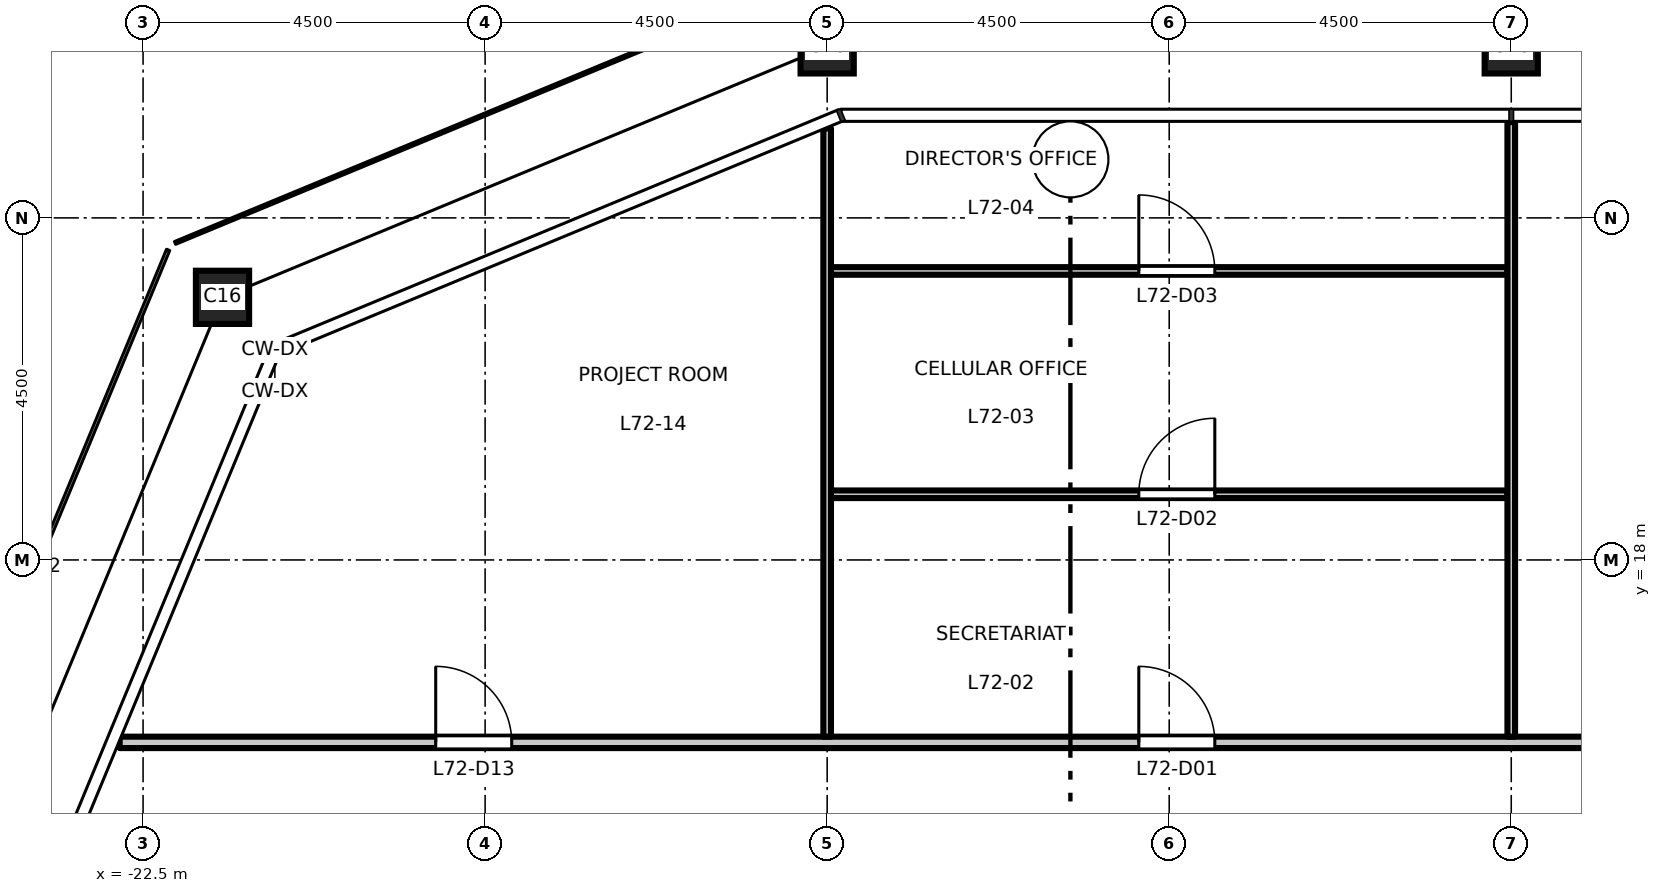
"""IFC4 building model, lengths in metres.
Left out: names, types, materials, properties, quantities, classifications, styles, units other than length and angle.
Written with IfcOpenShell. Run it as: python <this file> out.ifc"""

import sys

from ifc_helpers import new_model, si_unit, direction, frame, frame_2d, origin, origin_2d, place, context, subcontext, project, spatial, rectangle, hollow_rectangle, extrude, element, fill, save


model = new_model("IFC4")
c1 = context("Model", 3, precision=1e-05, world=origin(), true_north=direction((0.0, 1.0)))
c2 = subcontext(c1, "Body", "Model", "MODEL_VIEW")
j1 = project(units=[si_unit("LENGTHUNIT", "METRE"), si_unit("PLANEANGLEUNIT", "RADIAN")], contexts=[c1])
p1 = place(None, origin())
s1 = spatial("IfcSite", under=j1, at=p1, CompositionType="ELEMENT")
p2 = place(p1, origin())
s2 = spatial("IfcBuilding", under=s1, at=p2, CompositionType="ELEMENT")
p3 = place(p2, frame((0.0, 0.0, 334.7)))
s3 = spatial("IfcBuildingStorey", under=s2, at=p3, CompositionType="ELEMENT", Elevation=334.7)
for number, where, z_axis, x_axis in (
    (1, (-4.5, 24.75, 0.0), (0.0, 0.0, 1.0), (1.0, 0.0, 0.0)),
    (2, (-13.5, 24.75, 0.0), (0.0, 0.0, 1.0), (1.0, 0.0, 0.0)),
    (3, (-21.455, 21.455, 0.0), (0.0, 0.0, 1.0), (1.0, 0.0, 0.0)),
):
    element("IfcColumn", number, at=place(p3, frame(where, z_axis=z_axis, x_axis=x_axis)), inside=s3, PredefinedType="COLUMN", context=c2, shape_type="SweptSolid", body=[
        extrude(hollow_rectangle(XDim=0.7, YDim=0.7, WallThickness=0.036, at=origin_2d()), origin(), (0.0, 0.0, 1.0), 4.5),
    ])
p4 = place(p3, frame((-22.808, 15.6, 0.0), z_axis=(0.0, 0.0, 1.0), x_axis=(1.0, 0.0, 0.0)))
e4 = element("IfcWall", 4, at=p4, inside=s3, PredefinedType="PARTITIONING", context=c2, shape_type="SweptSolid", body=[
    extrude(rectangle(XDim=45.616, YDim=0.15, at=frame_2d((22.808, 0.0))), origin(), (0.0, 0.0, 1.0), 4.35),
])
p5 = place(p4, frame((13.408, 0.0, 0.0)))
e5 = element("IfcOpeningElement", 5, at=p5, cuts=e4, PredefinedType="OPENING", context=c2, shape_type="SweptSolid", body=[
    extrude(rectangle(XDim=1.0, YDim=2.1, at=frame_2d((0.5, 1.05))), frame((0.0, 0.085, 0.0), z_axis=(0.0, -1.0, 0.0), x_axis=(1.0, 0.0, 0.0)), (0.0, 0.0, 1.0), 0.17),
])
p6 = place(p4, frame((22.408, 0.0, 0.0)))
e6 = element("IfcOpeningElement", 6, at=p6, cuts=e4, PredefinedType="OPENING", context=c2, shape_type="SweptSolid", body=[
    extrude(rectangle(XDim=1.0, YDim=2.1, at=frame_2d((0.5, 1.05))), frame((0.0, 0.085, 0.0), z_axis=(0.0, -1.0, 0.0), x_axis=(1.0, 0.0, 0.0)), (0.0, 0.0, 1.0), 0.17),
])
p7 = place(p4, frame((31.408, 0.0, 0.0)))
e7 = element("IfcOpeningElement", 7, at=p7, cuts=e4, PredefinedType="OPENING", context=c2, shape_type="SweptSolid", body=[
    extrude(rectangle(XDim=1.0, YDim=2.1, at=frame_2d((0.5, 1.05))), frame((0.0, 0.085, 0.0), z_axis=(0.0, -1.0, 0.0), x_axis=(1.0, 0.0, 0.0)), (0.0, 0.0, 1.0), 0.17),
])
p8 = place(p4, frame((4.158, 0.0, 0.0)))
e8 = element("IfcOpeningElement", 8, at=p8, cuts=e4, PredefinedType="OPENING", context=c2, shape_type="SweptSolid", body=[
    extrude(rectangle(XDim=1.0, YDim=2.1, at=frame_2d((0.5, 1.05))), frame((0.0, 0.085, 0.0), z_axis=(0.0, -1.0, 0.0), x_axis=(1.0, 0.0, 0.0)), (0.0, 0.0, 1.0), 0.17),
])
p9 = place(p4, frame((40.466, 0.0, 0.0)))
e9 = element("IfcOpeningElement", 9, at=p9, cuts=e4, PredefinedType="OPENING", context=c2, shape_type="SweptSolid", body=[
    extrude(rectangle(XDim=1.0, YDim=2.1, at=frame_2d((0.5, 1.05))), frame((0.0, 0.085, 0.0), z_axis=(0.0, -1.0, 0.0), x_axis=(1.0, 0.0, 0.0)), (0.0, 0.0, 1.0), 0.17),
])
p10 = place(p3, frame((-13.45, 18.864, 0.0), z_axis=(0.0, 0.0, 1.0), x_axis=(1.0, 0.0, 0.0)))
e10 = element("IfcWall", 10, at=p10, inside=s3, PredefinedType="PARTITIONING", context=c2, shape_type="SweptSolid", body=[
    extrude(rectangle(XDim=8.9, YDim=0.1, at=frame_2d((4.45, 0.0))), origin(), (0.0, 0.0, 1.0), 4.35),
])
p11 = place(p10, frame((4.05, 0.0, 0.0)))
e11 = element("IfcOpeningElement", 11, at=p11, cuts=e10, PredefinedType="OPENING", context=c2, shape_type="SweptSolid", body=[
    extrude(rectangle(XDim=1.0, YDim=2.1, at=frame_2d((0.5, 1.05))), frame((0.0, 0.06, 0.0), z_axis=(0.0, -1.0, 0.0), x_axis=(1.0, 0.0, 0.0)), (0.0, 0.0, 1.0), 0.12),
])
p12 = place(p3, frame((-13.45, 21.802, 0.0), z_axis=(0.0, 0.0, 1.0), x_axis=(1.0, 0.0, 0.0)))
e12 = element("IfcWall", 12, at=p12, inside=s3, PredefinedType="PARTITIONING", context=c2, shape_type="SweptSolid", body=[
    extrude(rectangle(XDim=8.9, YDim=0.1, at=frame_2d((4.45, 0.0))), origin(), (0.0, 0.0, 1.0), 4.35),
])
p13 = place(p12, frame((4.05, 0.0, 0.0)))
e13 = element("IfcOpeningElement", 13, at=p13, cuts=e12, PredefinedType="OPENING", context=c2, shape_type="SweptSolid", body=[
    extrude(rectangle(XDim=1.0, YDim=2.1, at=frame_2d((0.5, 1.05))), frame((0.0, 0.06, 0.0), z_axis=(0.0, -1.0, 0.0), x_axis=(1.0, 0.0, 0.0)), (0.0, 0.0, 1.0), 0.12),
])
p14 = place(p3, frame((-13.5, 15.675, 0.0), z_axis=(0.0, 0.0, 1.0), x_axis=(0.0, 1.0, 0.0)))
e14 = element("IfcWall", 14, at=p14, inside=s3, PredefinedType="PARTITIONING", context=c2, shape_type="SweptSolid", body=[
    extrude(rectangle(XDim=8.003, YDim=0.1, at=frame_2d((4.001, 0.0))), origin(), (0.0, 0.0, 1.0), 3.75),
])
p15 = place(p3, frame((-4.5, 15.675, 0.0), z_axis=(0.0, 0.0, 1.0), x_axis=(0.0, 1.0, 0.0)))
e15 = element("IfcWall", 15, at=p15, inside=s3, PredefinedType="PARTITIONING", context=c2, shape_type="SweptSolid", body=[
    extrude(rectangle(XDim=8.085, YDim=0.1, at=frame_2d((4.042, 0.0))), origin(), (0.0, 0.0, 1.0), 3.65),
])
p16 = place(p5, origin())
e16 = element("IfcDoor", 16, at=p16, inside=s3, OperationType="SINGLE_SWING_LEFT", PredefinedType="DOOR", context=c2, shape_type="SweptSolid", body=[
    extrude(rectangle(XDim=1.0, YDim=2.1, at=frame_2d((0.5, 1.05))), frame((0.0, 0.025, 0.0), z_axis=(0.0, -1.0, 0.0), x_axis=(1.0, 0.0, 0.0)), (0.0, 0.0, 1.0), 0.05),
])
fill(e5, e16)
p17 = place(p11, origin())
e17 = element("IfcDoor", 17, at=p17, inside=s3, OperationType="SINGLE_SWING_RIGHT", PredefinedType="DOOR", context=c2, shape_type="SweptSolid", body=[
    extrude(rectangle(XDim=1.0, YDim=2.1, at=frame_2d((0.5, 1.05))), frame((0.0, 0.025, 0.0), z_axis=(0.0, -1.0, 0.0), x_axis=(1.0, 0.0, 0.0)), (0.0, 0.0, 1.0), 0.05),
])
fill(e11, e17)
p18 = place(p13, origin())
e18 = element("IfcDoor", 18, at=p18, inside=s3, OperationType="SINGLE_SWING_LEFT", PredefinedType="DOOR", context=c2, shape_type="SweptSolid", body=[
    extrude(rectangle(XDim=1.0, YDim=2.1, at=frame_2d((0.5, 1.05))), frame((0.0, 0.025, 0.0), z_axis=(0.0, -1.0, 0.0), x_axis=(1.0, 0.0, 0.0)), (0.0, 0.0, 1.0), 0.05),
])
fill(e13, e18)
p19 = place(p8, origin())
e19 = element("IfcDoor", 19, at=p19, inside=s3, OperationType="SINGLE_SWING_LEFT", PredefinedType="DOOR", context=c2, shape_type="SweptSolid", body=[
    extrude(rectangle(XDim=1.0, YDim=2.1, at=frame_2d((0.5, 1.05))), frame((0.0, 0.025, 0.0), z_axis=(0.0, -1.0, 0.0), x_axis=(1.0, 0.0, 0.0)), (0.0, 0.0, 1.0), 0.05),
])
fill(e8, e19)
save(model, sys.argv[1])
